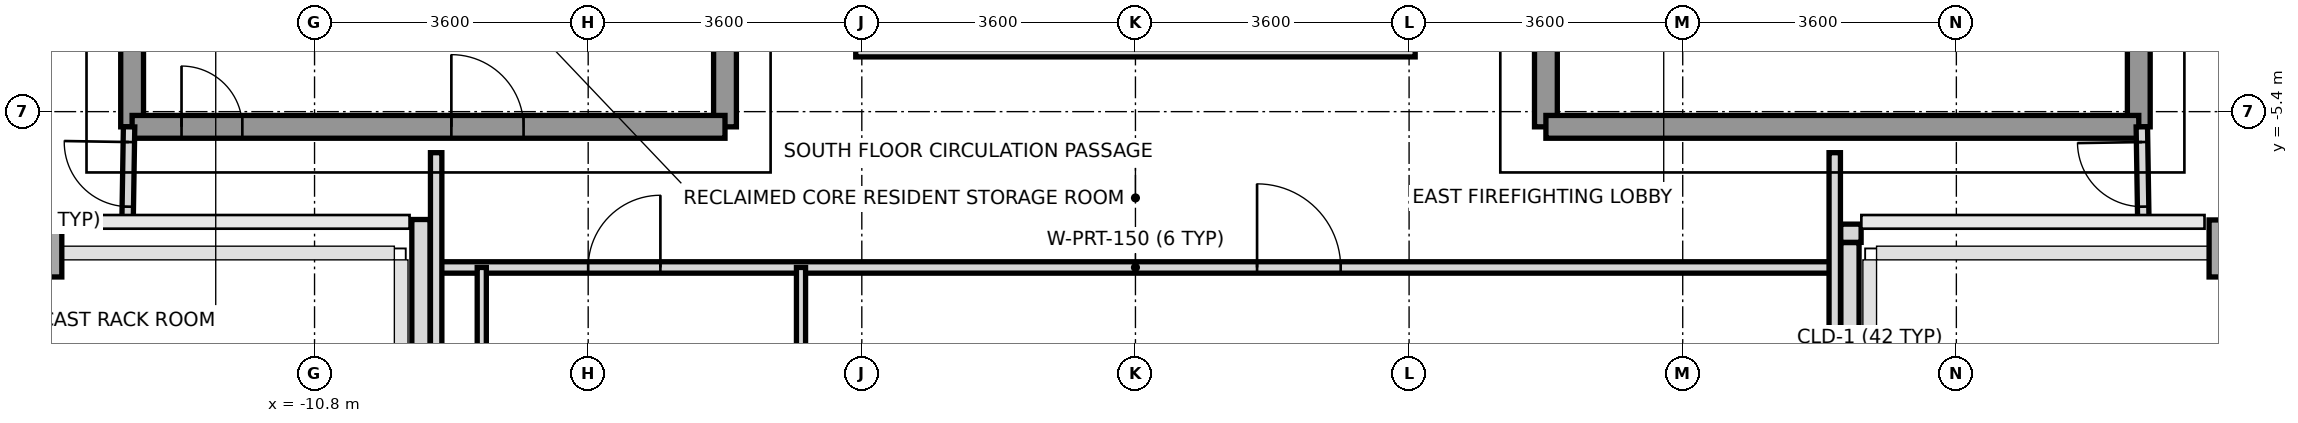
"""IFC4 building model, lengths in metres.
Left out: names, types, materials, properties, quantities, classifications, styles, units other than length and angle.
Written with IfcOpenShell. Run it as: python <this file> out.ifc"""

import sys

from ifc_helpers import new_model, si_unit, direction, frame, frame_2d, origin, origin_2d, place, context, subcontext, project, spatial, rectangle, extrude, source, transform, mapped, element, fill, save


model = new_model("IFC4")
c1 = context("Model", 3, precision=1e-05, world=origin(), true_north=direction((0.0, 1.0)))
c2 = subcontext(c1, "Body", "Model", "MODEL_VIEW")
j1 = project(units=[si_unit("LENGTHUNIT", "METRE"), si_unit("PLANEANGLEUNIT", "RADIAN")], contexts=[c1])
p1 = place(None, origin())
s1 = spatial("IfcSite", under=j1, at=p1, CompositionType="ELEMENT")
p2 = place(p1, origin())
s2 = spatial("IfcBuilding", under=s1, at=p2, CompositionType="ELEMENT")
p3 = place(p2, frame((0.0, 0.0, 249.2)))
s3 = spatial("IfcBuildingStorey", under=s2, at=p3, CompositionType="ELEMENT", Elevation=249.2)
m1 = source(origin(), c2, "Body", "SweptSolid", [
    extrude(rectangle(XDim=0.55, YDim=0.75, at=origin_2d()), origin(), (0.0, 0.0, 1.0), 3.01),
])
for number, where, z_axis, x_axis in (
    (1, (-14.4, -7.2, 0.0), (0.0, 0.0, 1.0), (1.0, 0.0, 0.0)),
    (2, (14.4, -7.2, 0.0), (0.0, 0.0, 1.0), (1.0, 0.0, 0.0)),
):
    element("IfcColumn", number, at=place(p3, frame(where, z_axis=z_axis, x_axis=x_axis)), inside=s3, PredefinedType="COLUMN", context=c2, shape_type="MappedRepresentation", body=[
        mapped(m1, transform((0.0, 0.0, 0.0), x_axis=(1.0, 0.0, 0.0), y_axis=(0.0, 1.0, 0.0), z_axis=(0.0, 0.0, 1.0), scale=1.0)),
    ])
p4 = place(p3, frame((9.547, -7.0, 0.0), z_axis=(0.0, 0.0, 1.0), x_axis=(-1.0, 0.0, 0.0)))
e3 = element("IfcWall", 3, at=p4, inside=s3, PredefinedType="PARAPET", context=c2, shape_type="SweptSolid", body=[
    extrude(rectangle(XDim=0.269, YDim=0.24, at=frame_2d((0.135, 0.0))), origin(), (0.0, 0.0, 1.0), 1.15),
])
p5 = place(p3, frame((9.4, -7.123, 0.0), z_axis=(0.0, 0.0, 1.0), x_axis=(0.0, -1.0, 0.0)))
e4 = element("IfcWall", 4, at=p5, inside=s3, PredefinedType="PARAPET", context=c2, shape_type="SweptSolid", body=[
    extrude(rectangle(XDim=1.499, YDim=0.24, at=frame_2d((0.75, 0.0))), origin(), (0.0, 0.0, 1.0), 1.15),
])
p6 = place(p3, frame((-9.4, -8.622, 0.0), z_axis=(0.0, 0.0, 1.0), x_axis=(0.0, 1.0, 0.0)))
e5 = element("IfcWall", 5, at=p6, inside=s3, PredefinedType="PARAPET", context=c2, shape_type="SweptSolid", body=[
    extrude(rectangle(XDim=1.803, YDim=0.24, at=frame_2d((0.901, 0.0))), origin(), (0.0, 0.0, 1.0), 1.15),
])
p7 = place(p3, frame((-13.2, -5.6, 0.0), z_axis=(0.0, 0.0, 1.0), x_axis=(0.0, 1.0, 0.0)))
e6 = element("IfcWall", 6, at=p7, inside=s3, PredefinedType="SHEAR", context=c2, shape_type="SweptSolid", body=[
    extrude(rectangle(XDim=11.2, YDim=0.3, at=frame_2d((5.6, 0.0))), origin(), (0.0, 0.0, 1.0), 3.01),
])
p8 = place(p3, frame((-5.4, -5.6, 0.0), z_axis=(0.0, 0.0, 1.0), x_axis=(0.0, 1.0, 0.0)))
e7 = element("IfcWall", 7, at=p8, inside=s3, PredefinedType="SHEAR", context=c2, shape_type="SweptSolid", body=[
    extrude(rectangle(XDim=12.5, YDim=0.3, at=frame_2d((6.25, 0.0))), origin(), (0.0, 0.0, 1.0), 3.01),
])
p9 = place(p8, frame((4.55, 0.0, 0.0)))
e8 = element("IfcOpeningElement", 8, at=p9, cuts=e7, PredefinedType="OPENING", context=c2, shape_type="SweptSolid", body=[
    extrude(rectangle(XDim=1.2, YDim=2.2, at=frame_2d((0.6, 1.1))), frame((0.0, 0.16, 0.0), z_axis=(0.0, -1.0, 0.0), x_axis=(1.0, 0.0, 0.0)), (0.0, 0.0, 1.0), 0.32),
])
p10 = place(p8, frame((10.45, 0.0, 0.0)))
e9 = element("IfcOpeningElement", 9, at=p10, cuts=e7, PredefinedType="OPENING", context=c2, shape_type="SweptSolid", body=[
    extrude(rectangle(XDim=1.2, YDim=2.2, at=frame_2d((0.6, 1.1))), frame((0.0, 0.16, 0.0), z_axis=(0.0, -1.0, 0.0), x_axis=(1.0, 0.0, 0.0)), (0.0, 0.0, 1.0), 0.32),
])
p11 = place(p8, frame((6.86, 0.0, 0.0)))
e10 = element("IfcOpeningElement", 10, at=p11, cuts=e7, PredefinedType="OPENING", context=c2, shape_type="SweptSolid", body=[
    extrude(rectangle(XDim=0.8, YDim=2.1, at=frame_2d((0.4, 1.05))), frame((0.0, 0.16, 0.0), z_axis=(0.0, -1.0, 0.0), x_axis=(1.0, 0.0, 0.0)), (0.0, 0.0, 1.0), 0.32),
])
p12 = place(p3, frame((-13.2, -5.6, 0.0), z_axis=(0.0, 0.0, 1.0), x_axis=(1.0, 0.0, 0.0)))
e11 = element("IfcWall", 11, at=p12, inside=s3, PredefinedType="SHEAR", context=c2, shape_type="SweptSolid", body=[
    extrude(rectangle(XDim=7.8, YDim=0.3, at=frame_2d((3.9, 0.0))), origin(), (0.0, 0.0, 1.0), 3.01),
])
p13 = place(p12, frame((0.65, 0.0, 0.0)))
e12 = element("IfcOpeningElement", 12, at=p13, cuts=e11, PredefinedType="OPENING", context=c2, shape_type="SweptSolid", body=[
    extrude(rectangle(XDim=0.8, YDim=2.1, at=frame_2d((0.4, 1.05))), frame((0.0, 0.16, 0.0), z_axis=(0.0, -1.0, 0.0), x_axis=(1.0, 0.0, 0.0)), (0.0, 0.0, 1.0), 0.32),
])
p14 = place(p12, frame((4.2, 0.0, 0.0)))
e13 = element("IfcOpeningElement", 13, at=p14, cuts=e11, PredefinedType="OPENING", context=c2, shape_type="SweptSolid", body=[
    extrude(rectangle(XDim=0.95, YDim=2.15, at=frame_2d((0.475, 1.075))), frame((0.0, 0.16, 0.0), z_axis=(0.0, -1.0, 0.0), x_axis=(1.0, 0.0, 0.0)), (0.0, 0.0, 1.0), 0.32),
])
p15 = place(p3, frame((13.2, -5.6, 0.0), z_axis=(0.0, 0.0, 1.0), x_axis=(0.0, 1.0, 0.0)))
e14 = element("IfcWall", 14, at=p15, inside=s3, PredefinedType="SHEAR", context=c2, shape_type="SweptSolid", body=[
    extrude(rectangle(XDim=11.2, YDim=0.3, at=frame_2d((5.6, 0.0))), origin(), (0.0, 0.0, 1.0), 3.01),
])
p16 = place(p3, frame((5.4, -5.6, 0.0), z_axis=(0.0, 0.0, 1.0), x_axis=(0.0, 1.0, 0.0)))
e15 = element("IfcWall", 15, at=p16, inside=s3, PredefinedType="SHEAR", context=c2, shape_type="SweptSolid", body=[
    extrude(rectangle(XDim=12.5, YDim=0.3, at=frame_2d((6.25, 0.0))), origin(), (0.0, 0.0, 1.0), 3.01),
])
p17 = place(p16, frame((4.55, 0.0, 0.0)))
e16 = element("IfcOpeningElement", 16, at=p17, cuts=e15, PredefinedType="OPENING", context=c2, shape_type="SweptSolid", body=[
    extrude(rectangle(XDim=1.2, YDim=2.2, at=frame_2d((0.6, 1.1))), frame((0.0, 0.16, 0.0), z_axis=(0.0, -1.0, 0.0), x_axis=(1.0, 0.0, 0.0)), (0.0, 0.0, 1.0), 0.32),
])
p18 = place(p16, frame((10.45, 0.0, 0.0)))
e17 = element("IfcOpeningElement", 17, at=p18, cuts=e15, PredefinedType="OPENING", context=c2, shape_type="SweptSolid", body=[
    extrude(rectangle(XDim=1.2, YDim=2.2, at=frame_2d((0.6, 1.1))), frame((0.0, 0.16, 0.0), z_axis=(0.0, -1.0, 0.0), x_axis=(1.0, 0.0, 0.0)), (0.0, 0.0, 1.0), 0.32),
])
p19 = place(p16, frame((6.86, 0.0, 0.0)))
e18 = element("IfcOpeningElement", 18, at=p19, cuts=e15, PredefinedType="OPENING", context=c2, shape_type="SweptSolid", body=[
    extrude(rectangle(XDim=0.8, YDim=2.1, at=frame_2d((0.4, 1.05))), frame((0.0, 0.16, 0.0), z_axis=(0.0, -1.0, 0.0), x_axis=(1.0, 0.0, 0.0)), (0.0, 0.0, 1.0), 0.32),
])
p20 = place(p3, frame((5.4, -5.6, 0.0), z_axis=(0.0, 0.0, 1.0), x_axis=(1.0, 0.0, 0.0)))
e19 = element("IfcWall", 19, at=p20, inside=s3, PredefinedType="SHEAR", context=c2, shape_type="SweptSolid", body=[
    extrude(rectangle(XDim=7.8, YDim=0.3, at=frame_2d((3.9, 0.0))), origin(), (0.0, 0.0, 1.0), 3.01),
])
p21 = place(p3, frame((-9.2, -7.45, 0.0), z_axis=(0.0, 0.0, 1.0), x_axis=(1.0, 0.0, 0.0)))
e20 = element("IfcWall", 20, at=p21, inside=s3, PredefinedType="PARTITIONING", context=c2, shape_type="SweptSolid", body=[
    extrude(rectangle(XDim=18.4, YDim=0.15, at=frame_2d((9.2, 0.0))), origin(), (0.0, 0.0, 1.0), 2.57),
])
p22 = place(p21, frame((2.0, 0.0, 0.0)))
e21 = element("IfcOpeningElement", 21, at=p22, cuts=e20, PredefinedType="OPENING", context=c2, shape_type="SweptSolid", body=[
    extrude(rectangle(XDim=0.95, YDim=2.15, at=frame_2d((0.475, 1.075))), frame((0.0, 0.085, 0.0), z_axis=(0.0, -1.0, 0.0), x_axis=(1.0, 0.0, 0.0)), (0.0, 0.0, 1.0), 0.17),
])
p23 = place(p21, frame((10.8, 0.0, 0.0)))
e22 = element("IfcOpeningElement", 22, at=p23, cuts=e20, PredefinedType="OPENING", context=c2, shape_type="SweptSolid", body=[
    extrude(rectangle(XDim=1.1, YDim=2.2, at=frame_2d((0.55, 1.1))), frame((0.0, 0.085, 0.0), z_axis=(0.0, -1.0, 0.0), x_axis=(1.0, 0.0, 0.0)), (0.0, 0.0, 1.0), 0.17),
])
for number, where, z_axis, x_axis in (
    (23, (-9.2, -10.28, 0.0), (0.0, 0.0, 1.0), (0.0, 1.0, 0.0)),
    (24, (9.2, -10.28, 0.0), (0.0, 0.0, 1.0), (0.0, 1.0, 0.0)),
):
    element("IfcWall", number, at=place(p3, frame(where, z_axis=z_axis, x_axis=x_axis)), inside=s3, PredefinedType="PARTITIONING", context=c2, shape_type="SweptSolid", body=[
        extrude(rectangle(XDim=4.34, YDim=0.15, at=frame_2d((2.17, 0.0))), origin(), (0.0, 0.0, 1.0), 2.61),
    ])
for number, where, z_axis, x_axis in (
    (25, (-8.6, -11.05, 0.0), (0.0, 0.0, 1.0), (0.0, 1.0, 0.0)),
    (26, (-4.4, -11.05, 0.0), (0.0, 0.0, 1.0), (0.0, 1.0, 0.0)),
):
    element("IfcWall", number, at=place(p3, frame(where, z_axis=z_axis, x_axis=x_axis)), inside=s3, PredefinedType="PARTITIONING", context=c2, shape_type="SweptSolid", body=[
        extrude(rectangle(XDim=3.6, YDim=0.12, at=frame_2d((1.8, 0.0))), origin(), (0.0, 0.0, 1.0), 2.61),
    ])
p24 = place(p3, frame((-13.26, -6.85, 0.0), z_axis=(0.0, 0.0, 1.0), x_axis=(0.016013571389, 0.999871774545, 0.0)))
e27 = element("IfcWall", 27, at=p24, inside=s3, PredefinedType="PARTITIONING", context=c2, shape_type="SweptSolid", body=[
    extrude(rectangle(XDim=1.25, YDim=0.15, at=frame_2d((0.625, 0.0))), origin(), (0.0, 0.0, 1.0), 3.01),
])
p25 = place(p24, frame((0.2, 0.0, 0.0)))
e28 = element("IfcOpeningElement", 28, at=p25, cuts=e27, PredefinedType="OPENING", context=c2, shape_type="SweptSolid", body=[
    extrude(rectangle(XDim=0.85, YDim=2.1, at=frame_2d((0.425, 1.05))), frame((0.0, 0.085, 0.0), z_axis=(0.0, -1.0, 0.0), x_axis=(1.0, 0.0, 0.0)), (0.0, 0.0, 1.0), 0.17),
])
p26 = place(p3, frame((13.26, -6.85, 0.0), z_axis=(0.0, 0.0, 1.0), x_axis=(-0.016013571389, 0.999871774545, 0.0)))
e29 = element("IfcWall", 29, at=p26, inside=s3, PredefinedType="PARTITIONING", context=c2, shape_type="SweptSolid", body=[
    extrude(rectangle(XDim=1.25, YDim=0.15, at=frame_2d((0.625, 0.0))), origin(), (0.0, 0.0, 1.0), 3.01),
])
p27 = place(p26, frame((0.2, 0.0, 0.0)))
e30 = element("IfcOpeningElement", 30, at=p27, cuts=e29, PredefinedType="OPENING", context=c2, shape_type="SweptSolid", body=[
    extrude(rectangle(XDim=0.85, YDim=2.1, at=frame_2d((0.425, 1.05))), frame((0.0, 0.085, 0.0), z_axis=(0.0, -1.0, 0.0), x_axis=(1.0, 0.0, 0.0)), (0.0, 0.0, 1.0), 0.17),
])
p28 = place(p3, frame((-3.68, -4.56, 0.0), z_axis=(0.0, 0.0, 1.0), x_axis=(1.0, 0.0, 0.0)))
e31 = element("IfcWall", 31, at=p28, inside=s3, PredefinedType="PARAPET", context=c2, shape_type="SweptSolid", body=[
    extrude(rectangle(XDim=7.36, YDim=0.24, at=frame_2d((3.68, 0.0))), origin(), (0.0, 0.0, 1.0), 1.15),
])
m2 = source(origin(), c2, "Body", "SweptSolid", [
    extrude(rectangle(XDim=0.8, YDim=2.1, at=frame_2d((0.4, 1.05))), frame((0.0, 0.025, 0.0), z_axis=(0.0, -1.0, 0.0), x_axis=(1.0, 0.0, 0.0)), (0.0, 0.0, 1.0), 0.05),
])
p29 = place(p13, origin())
e32 = element("IfcDoor", 32, at=p29, inside=s3, OperationType="SINGLE_SWING_LEFT", PredefinedType="DOOR", context=c2, shape_type="MappedRepresentation", body=[
    mapped(m2, transform((0.0, 0.0, 0.0), x_axis=(1.0, 0.0, 0.0), y_axis=(0.0, 1.0, 0.0), z_axis=(0.0, 0.0, 1.0), scale=1.0)),
])
fill(e12, e32)
m3 = source(origin(), c2, "Body", "SweptSolid", [
    extrude(rectangle(XDim=0.95, YDim=2.15, at=frame_2d((0.475, 1.075))), frame((0.0, 0.025, 0.0), z_axis=(0.0, -1.0, 0.0), x_axis=(1.0, 0.0, 0.0)), (0.0, 0.0, 1.0), 0.05),
])
p30 = place(p14, origin())
e33 = element("IfcDoor", 33, at=p30, inside=s3, OperationType="SINGLE_SWING_LEFT", PredefinedType="DOOR", context=c2, shape_type="MappedRepresentation", body=[
    mapped(m3, transform((0.0, 0.0, 0.0), x_axis=(1.0, 0.0, 0.0), y_axis=(0.0, 1.0, 0.0), z_axis=(0.0, 0.0, 1.0), scale=1.0)),
])
fill(e13, e33)
p31 = place(p22, origin())
e34 = element("IfcDoor", 34, at=p31, inside=s3, OperationType="SINGLE_SWING_RIGHT", PredefinedType="DOOR", context=c2, shape_type="MappedRepresentation", body=[
    mapped(m3, transform((0.0, 0.0, 0.0), x_axis=(1.0, 0.0, 0.0), y_axis=(0.0, 1.0, 0.0), z_axis=(0.0, 0.0, 1.0), scale=1.0)),
])
fill(e21, e34)
m4 = source(origin(), c2, "Body", "SweptSolid", [
    extrude(rectangle(XDim=1.1, YDim=2.2, at=frame_2d((0.55, 1.1))), frame((0.0, 0.025, 0.0), z_axis=(0.0, -1.0, 0.0), x_axis=(1.0, 0.0, 0.0)), (0.0, 0.0, 1.0), 0.05),
])
p32 = place(p23, origin())
e35 = element("IfcDoor", 35, at=p32, inside=s3, OperationType="SINGLE_SWING_LEFT", PredefinedType="DOOR", context=c2, shape_type="MappedRepresentation", body=[
    mapped(m4, transform((0.0, 0.0, 0.0), x_axis=(1.0, 0.0, 0.0), y_axis=(0.0, 1.0, 0.0), z_axis=(0.0, 0.0, 1.0), scale=1.0)),
])
fill(e22, e35)
m5 = source(origin(), c2, "Body", "SweptSolid", [
    extrude(rectangle(XDim=0.85, YDim=2.1, at=frame_2d((0.425, 1.05))), frame((0.0, 0.025, 0.0), z_axis=(0.0, -1.0, 0.0), x_axis=(1.0, 0.0, 0.0)), (0.0, 0.0, 1.0), 0.05),
])
p33 = place(p25, origin())
e36 = element("IfcDoor", 36, at=p33, inside=s3, OperationType="SINGLE_SWING_RIGHT", PredefinedType="DOOR", context=c2, shape_type="MappedRepresentation", body=[
    mapped(m5, transform((0.0, 0.0, 0.0), x_axis=(1.0, 0.0, 0.0), y_axis=(0.0, 1.0, 0.0), z_axis=(0.0, 0.0, 1.0), scale=1.0)),
])
fill(e28, e36)
p34 = place(p27, origin())
e37 = element("IfcDoor", 37, at=p34, inside=s3, OperationType="SINGLE_SWING_RIGHT", PredefinedType="DOOR", context=c2, shape_type="MappedRepresentation", body=[
    mapped(m5, transform((0.0, 0.0, 0.0), x_axis=(1.0, 0.0, 0.0), y_axis=(0.0, 1.0, 0.0), z_axis=(0.0, 0.0, 1.0), scale=1.0)),
])
fill(e30, e37)
save(model, sys.argv[1])
